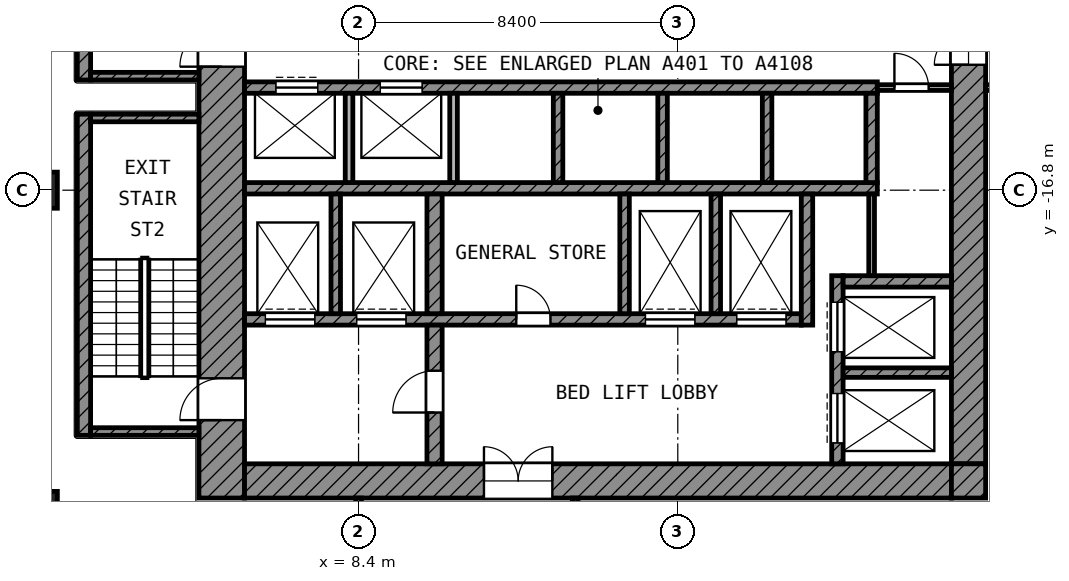
"""IFC4 building model, lengths in metres.
Left out: names, types, materials, properties, quantities, classifications, styles, units other than length and angle.
Written with IfcOpenShell. Run it as: python <this file> out.ifc"""

import sys

from ifc_helpers import new_model, si_unit, direction, frame, frame_2d, origin, origin_2d, place, context, subcontext, project, spatial, rectangle, extrude, element, fill, save


model = new_model("IFC4")
c1 = context("Model", 3, precision=1e-05, world=origin(), true_north=direction((0.0, 1.0)))
c2 = subcontext(c1, "Body", "Model", "MODEL_VIEW")
j1 = project(units=[si_unit("LENGTHUNIT", "METRE"), si_unit("PLANEANGLEUNIT", "RADIAN")], contexts=[c1])
p1 = place(None, origin())
s1 = spatial("IfcSite", under=j1, at=p1, CompositionType="ELEMENT")
p2 = place(p1, origin())
s2 = spatial("IfcBuilding", under=s1, at=p2, CompositionType="ELEMENT")
p3 = place(p2, frame((0.0, 0.0, 166.8)))
s3 = spatial("IfcBuildingStorey", under=s2, at=p3, CompositionType="ELEMENT", Elevation=166.8)
for number, where, z_axis, x_axis in (
    (1, (0.0, -16.8, 0.0), (0.0, 0.0, 1.0), (1.0, 0.0, 0.0)),
    (2, (0.0, -25.2, 0.0), (0.0, 0.0, 1.0), (1.0, 0.0, 0.0)),
):
    element("IfcColumn", number, at=place(p3, frame(where, z_axis=z_axis, x_axis=x_axis)), inside=s3, PredefinedType="COLUMN", context=c2, shape_type="SweptSolid", body=[
        extrude(rectangle(XDim=0.95, YDim=0.95, at=origin_2d()), origin(), (0.0, 0.0, 1.0), 4.2),
    ])
p4 = place(p3, frame((4.8, -24.9, 0.0), z_axis=(0.0, 0.0, 1.0), x_axis=(0.0, 1.0, 0.0)))
e3 = element("IfcWall", 3, at=p4, inside=s3, PredefinedType="SHEAR", context=c2, shape_type="SweptSolid", body=[
    extrude(rectangle(XDim=19.5, YDim=1.2, at=frame_2d((9.75, 0.0))), origin(), (0.0, 0.0, 1.0), 3.6),
])
p5 = place(p4, frame((11.35, 0.0, 0.0)))
e4 = element("IfcOpeningElement", 4, at=p5, cuts=e3, PredefinedType="OPENING", context=c2, shape_type="SweptSolid", body=[
    extrude(rectangle(XDim=1.1, YDim=2.1, at=frame_2d((0.55, 1.05))), frame((0.0, 0.61, 0.0), z_axis=(0.0, -1.0, 0.0), x_axis=(1.0, 0.0, 0.0)), (0.0, 0.0, 1.0), 1.22),
])
p6 = place(p4, frame((2.05, 0.0, 0.0)))
e5 = element("IfcOpeningElement", 5, at=p6, cuts=e3, PredefinedType="OPENING", context=c2, shape_type="SweptSolid", body=[
    extrude(rectangle(XDim=1.1, YDim=2.1, at=frame_2d((0.55, 1.05))), frame((0.0, 0.61, 0.0), z_axis=(0.0, -1.0, 0.0), x_axis=(1.0, 0.0, 0.0)), (0.0, 0.0, 1.0), 1.22),
])
p7 = place(p3, frame((24.45, -24.0, 0.0), z_axis=(0.0, 0.0, 1.0), x_axis=(0.0, 1.0, 0.0)))
e6 = element("IfcWall", 6, at=p7, inside=s3, PredefinedType="SHEAR", context=c2, shape_type="SweptSolid", body=[
    extrude(rectangle(XDim=18.6, YDim=0.9, at=frame_2d((9.3, 0.0))), origin(), (0.0, 0.0, 1.0), 3.6),
])
p8 = place(p7, frame((10.5, 0.0, 0.0)))
e7 = element("IfcOpeningElement", 7, at=p8, cuts=e6, PredefinedType="OPENING", context=c2, shape_type="SweptSolid", body=[
    extrude(rectangle(XDim=1.8, YDim=2.1, at=frame_2d((0.9, 1.05))), frame((0.0, 0.46, 0.0), z_axis=(0.0, -1.0, 0.0), x_axis=(1.0, 0.0, 0.0)), (0.0, 0.0, 1.0), 0.92),
])
p9 = place(p3, frame((5.4, -24.45, 0.0), z_axis=(0.0, 0.0, 1.0), x_axis=(1.0, 0.0, 0.0)))
e8 = element("IfcWall", 8, at=p9, inside=s3, PredefinedType="SHEAR", context=c2, shape_type="SweptSolid", body=[
    extrude(rectangle(XDim=18.6, YDim=0.9, at=frame_2d((9.3, 0.0))), origin(), (0.0, 0.0, 1.0), 3.6),
])
p10 = place(p9, frame((6.3, 0.0, 0.0)))
e9 = element("IfcOpeningElement", 9, at=p10, cuts=e8, PredefinedType="OPENING", context=c2, shape_type="SweptSolid", body=[
    extrude(rectangle(XDim=1.8, YDim=2.1, at=frame_2d((0.9, 1.05))), frame((0.0, 0.46, 0.0), z_axis=(0.0, -1.0, 0.0), x_axis=(1.0, 0.0, 0.0)), (0.0, 0.0, 1.0), 0.92),
])
p11 = place(p3, frame((24.45, -24.9, 0.0), z_axis=(0.0, 0.0, 1.0), x_axis=(0.0, 1.0, 0.0)))
e10 = element("IfcWall", 10, at=p11, inside=s3, PredefinedType="SHEAR", context=c2, shape_type="SweptSolid", body=[
    extrude(rectangle(XDim=0.9, YDim=0.9, at=frame_2d((0.45, 0.0))), origin(), (0.0, 0.0, 1.0), 3.6),
])
p12 = place(p3, frame((5.4, -14.1, 0.0), z_axis=(0.0, 0.0, 1.0), x_axis=(1.0, 0.0, 0.0)))
e11 = element("IfcWall", 11, at=p12, inside=s3, PredefinedType="SHEAR", context=c2, shape_type="SweptSolid", body=[
    extrude(rectangle(XDim=16.65, YDim=0.3, at=frame_2d((8.325, 0.0))), origin(), (0.0, 0.0, 1.0), 3.6),
])
p13 = place(p12, frame((0.825, 0.0, 0.0)))
e12 = element("IfcOpeningElement", 12, at=p13, cuts=e11, PredefinedType="OPENING", context=c2, shape_type="SweptSolid", body=[
    extrude(rectangle(XDim=1.1, YDim=2.1, at=frame_2d((0.55, 1.05))), frame((0.0, 0.16, 0.0), z_axis=(0.0, -1.0, 0.0), x_axis=(1.0, 0.0, 0.0)), (0.0, 0.0, 1.0), 0.32),
])
p14 = place(p12, frame((3.575, 0.0, 0.0)))
e13 = element("IfcOpeningElement", 13, at=p14, cuts=e11, PredefinedType="OPENING", context=c2, shape_type="SweptSolid", body=[
    extrude(rectangle(XDim=1.1, YDim=2.1, at=frame_2d((0.55, 1.05))), frame((0.0, 0.16, 0.0), z_axis=(0.0, -1.0, 0.0), x_axis=(1.0, 0.0, 0.0)), (0.0, 0.0, 1.0), 0.32),
])
p15 = place(p3, frame((5.4, -16.75, 0.0), z_axis=(0.0, 0.0, 1.0), x_axis=(1.0, 0.0, 0.0)))
e14 = element("IfcWall", 14, at=p15, inside=s3, PredefinedType="SHEAR", context=c2, shape_type="SweptSolid", body=[
    extrude(rectangle(XDim=16.65, YDim=0.3, at=frame_2d((8.325, 0.0))), origin(), (0.0, 0.0, 1.0), 3.6),
])
p16 = place(p3, frame((5.4, -20.2, 0.0), z_axis=(0.0, 0.0, 1.0), x_axis=(1.0, 0.0, 0.0)))
e15 = element("IfcWall", 15, at=p16, inside=s3, PredefinedType="SHEAR", context=c2, shape_type="SweptSolid", body=[
    extrude(rectangle(XDim=14.65, YDim=0.3, at=frame_2d((7.325, 0.0))), origin(), (0.0, 0.0, 1.0), 3.6),
])
p17 = place(p16, frame((10.55, 0.0, 0.0)))
e16 = element("IfcOpeningElement", 16, at=p17, cuts=e15, PredefinedType="OPENING", context=c2, shape_type="SweptSolid", body=[
    extrude(rectangle(XDim=1.3, YDim=2.1, at=frame_2d((0.65, 1.05))), frame((0.0, 0.16, 0.0), z_axis=(0.0, -1.0, 0.0), x_axis=(1.0, 0.0, 0.0)), (0.0, 0.0, 1.0), 0.32),
])
p18 = place(p16, frame((12.95, 0.0, 0.0)))
e17 = element("IfcOpeningElement", 17, at=p18, cuts=e15, PredefinedType="OPENING", context=c2, shape_type="SweptSolid", body=[
    extrude(rectangle(XDim=1.3, YDim=2.1, at=frame_2d((0.65, 1.05))), frame((0.0, 0.16, 0.0), z_axis=(0.0, -1.0, 0.0), x_axis=(1.0, 0.0, 0.0)), (0.0, 0.0, 1.0), 0.32),
])
p19 = place(p16, frame((0.55, 0.0, 0.0)))
e18 = element("IfcOpeningElement", 18, at=p19, cuts=e15, PredefinedType="OPENING", context=c2, shape_type="SweptSolid", body=[
    extrude(rectangle(XDim=1.3, YDim=2.1, at=frame_2d((0.65, 1.05))), frame((0.0, 0.16, 0.0), z_axis=(0.0, -1.0, 0.0), x_axis=(1.0, 0.0, 0.0)), (0.0, 0.0, 1.0), 0.32),
])
p20 = place(p16, frame((2.95, 0.0, 0.0)))
e19 = element("IfcOpeningElement", 19, at=p20, cuts=e15, PredefinedType="OPENING", context=c2, shape_type="SweptSolid", body=[
    extrude(rectangle(XDim=1.3, YDim=2.1, at=frame_2d((0.65, 1.05))), frame((0.0, 0.16, 0.0), z_axis=(0.0, -1.0, 0.0), x_axis=(1.0, 0.0, 0.0)), (0.0, 0.0, 1.0), 0.32),
])
p21 = place(p16, frame((7.15, 0.0, 0.0)))
e20 = element("IfcOpeningElement", 20, at=p21, cuts=e15, PredefinedType="OPENING", context=c2, shape_type="SweptSolid", body=[
    extrude(rectangle(XDim=0.9, YDim=2.1, at=frame_2d((0.45, 1.05))), frame((0.0, 0.16, 0.0), z_axis=(0.0, -1.0, 0.0), x_axis=(1.0, 0.0, 0.0)), (0.0, 0.0, 1.0), 0.32),
])
p22 = place(p3, frame((10.4, -24.0, 0.0), z_axis=(0.0, 0.0, 1.0), x_axis=(0.0, 1.0, 0.0)))
e21 = element("IfcWall", 21, at=p22, inside=s3, PredefinedType="SHEAR", context=c2, shape_type="SweptSolid", body=[
    extrude(rectangle(XDim=3.65, YDim=0.4, at=frame_2d((1.825, 0.0))), origin(), (0.0, 0.0, 1.0), 3.6),
])
p23 = place(p22, frame((1.35, 0.0, 0.0)))
e22 = element("IfcOpeningElement", 22, at=p23, cuts=e21, PredefinedType="OPENING", context=c2, shape_type="SweptSolid", body=[
    extrude(rectangle(XDim=1.1, YDim=2.1, at=frame_2d((0.55, 1.05))), frame((0.0, 0.21, 0.0), z_axis=(0.0, -1.0, 0.0), x_axis=(1.0, 0.0, 0.0)), (0.0, 0.0, 1.0), 0.42),
])
p24 = place(p3, frame((10.4, -20.05, 0.0), z_axis=(0.0, 0.0, 1.0), x_axis=(0.0, 1.0, 0.0)))
e23 = element("IfcWall", 23, at=p24, inside=s3, PredefinedType="SHEAR", context=c2, shape_type="SweptSolid", body=[
    extrude(rectangle(XDim=3.15, YDim=0.4, at=frame_2d((1.575, 0.0))), origin(), (0.0, 0.0, 1.0), 3.6),
])
p25 = place(p3, frame((20.2, -20.35, 0.0), z_axis=(0.0, 0.0, 1.0), x_axis=(0.0, 1.0, 0.0)))
e24 = element("IfcWall", 24, at=p25, inside=s3, PredefinedType="SHEAR", context=c2, shape_type="SweptSolid", body=[
    extrude(rectangle(XDim=3.45, YDim=0.3, at=frame_2d((1.725, 0.0))), origin(), (0.0, 0.0, 1.0), 3.6),
])
p26 = place(p3, frame((21.9, -16.6, 0.0), z_axis=(0.0, 0.0, 1.0), x_axis=(0.0, 1.0, 0.0)))
e25 = element("IfcWall", 25, at=p26, inside=s3, PredefinedType="SHEAR", context=c2, shape_type="SweptSolid", body=[
    extrude(rectangle(XDim=2.35, YDim=0.3, at=frame_2d((1.175, 0.0))), origin(), (0.0, 0.0, 1.0), 3.6),
])
p27 = place(p3, frame((21.15, -19.2, 0.0), z_axis=(0.0, 0.0, 1.0), x_axis=(1.0, 0.0, 0.0)))
e26 = element("IfcWall", 26, at=p27, inside=s3, PredefinedType="SHEAR", context=c2, shape_type="SweptSolid", body=[
    extrude(rectangle(XDim=2.85, YDim=0.3, at=frame_2d((1.425, 0.0))), origin(), (0.0, 0.0, 1.0), 3.6),
])
p28 = place(p3, frame((21.0, -24.0, 0.0), z_axis=(0.0, 0.0, 1.0), x_axis=(0.0, 1.0, 0.0)))
e27 = element("IfcWall", 27, at=p28, inside=s3, PredefinedType="SHEAR", context=c2, shape_type="SweptSolid", body=[
    extrude(rectangle(XDim=4.95, YDim=0.3, at=frame_2d((2.475, 0.0))), origin(), (0.0, 0.0, 1.0), 3.6),
])
p29 = place(p28, frame((2.95, 0.0, 0.0)))
e28 = element("IfcOpeningElement", 28, at=p29, cuts=e27, PredefinedType="OPENING", context=c2, shape_type="SweptSolid", body=[
    extrude(rectangle(XDim=1.3, YDim=2.1, at=frame_2d((0.65, 1.05))), frame((0.0, 0.16, 0.0), z_axis=(0.0, -1.0, 0.0), x_axis=(1.0, 0.0, 0.0)), (0.0, 0.0, 1.0), 0.32),
])
p30 = place(p28, frame((0.55, 0.0, 0.0)))
e29 = element("IfcOpeningElement", 29, at=p30, cuts=e27, PredefinedType="OPENING", context=c2, shape_type="SweptSolid", body=[
    extrude(rectangle(XDim=1.3, YDim=2.1, at=frame_2d((0.65, 1.05))), frame((0.0, 0.16, 0.0), z_axis=(0.0, -1.0, 0.0), x_axis=(1.0, 0.0, 0.0)), (0.0, 0.0, 1.0), 0.32),
])
p31 = place(p3, frame((21.15, -21.6, 0.0), z_axis=(0.0, 0.0, 1.0), x_axis=(1.0, 0.0, 0.0)))
e30 = element("IfcWall", 30, at=p31, inside=s3, PredefinedType="SHEAR", context=c2, shape_type="SweptSolid", body=[
    extrude(rectangle(XDim=2.85, YDim=0.25, at=frame_2d((1.425, 0.0))), origin(), (0.0, 0.0, 1.0), 3.6),
])
for number, where, z_axis, x_axis in (
    (31, (7.8, -20.05, 0.0), (0.0, 0.0, 1.0), (0.0, 1.0, 0.0)),
    (32, (15.4, -20.05, 0.0), (0.0, 0.0, 1.0), (0.0, 1.0, 0.0)),
    (33, (17.8, -20.05, 0.0), (0.0, 0.0, 1.0), (0.0, 1.0, 0.0)),
):
    element("IfcWall", number, at=place(p3, frame(where, z_axis=z_axis, x_axis=x_axis)), inside=s3, PredefinedType="SHEAR", context=c2, shape_type="SweptSolid", body=[
        extrude(rectangle(XDim=3.15, YDim=0.25, at=frame_2d((1.575, 0.0))), origin(), (0.0, 0.0, 1.0), 3.6),
    ])
for number, where, z_axis, x_axis in (
    (34, (8.15, -16.6, 0.0), (0.0, 0.0, 1.0), (0.0, 1.0, 0.0)),
    (35, (10.9, -16.6, 0.0), (0.0, 0.0, 1.0), (0.0, 1.0, 0.0)),
):
    element("IfcWall", number, at=place(p3, frame(where, z_axis=z_axis, x_axis=x_axis)), inside=s3, PredefinedType="PARTITIONING", context=c2, shape_type="SweptSolid", body=[
        extrude(rectangle(XDim=2.35, YDim=0.2, at=frame_2d((1.175, 0.0))), origin(), (0.0, 0.0, 1.0), 3.6),
    ])
for number, where, z_axis, x_axis in (
    (36, (13.65, -16.6, 0.0), (0.0, 0.0, 1.0), (0.0, 1.0, 0.0)),
    (37, (16.4, -16.6, 0.0), (0.0, 0.0, 1.0), (0.0, 1.0, 0.0)),
    (38, (19.15, -16.6, 0.0), (0.0, 0.0, 1.0), (0.0, 1.0, 0.0)),
):
    element("IfcWall", number, at=place(p3, frame(where, z_axis=z_axis, x_axis=x_axis)), inside=s3, PredefinedType="SHEAR", context=c2, shape_type="SweptSolid", body=[
        extrude(rectangle(XDim=2.35, YDim=0.25, at=frame_2d((1.175, 0.0))), origin(), (0.0, 0.0, 1.0), 3.6),
    ])
p32 = place(p3, frame((21.9, -19.05, 0.0), z_axis=(0.0, 0.0, 1.0), x_axis=(0.0, 1.0, 0.0)))
e39 = element("IfcWall", 39, at=p32, inside=s3, PredefinedType="PARTITIONING", context=c2, shape_type="SweptSolid", body=[
    extrude(rectangle(XDim=2.15, YDim=0.15, at=frame_2d((1.075, 0.0))), origin(), (0.0, 0.0, 1.0), 3.6),
])
p33 = place(p3, frame((22.05, -14.1, 0.0), z_axis=(0.0, 0.0, 1.0), x_axis=(1.0, 0.0, 0.0)))
e40 = element("IfcWall", 40, at=p33, inside=s3, PredefinedType="PARTITIONING", context=c2, shape_type="SweptSolid", body=[
    extrude(rectangle(XDim=1.95, YDim=0.15, at=frame_2d((0.975, 0.0))), origin(), (0.0, 0.0, 1.0), 3.6),
])
p34 = place(p33, frame((0.45, 0.0, 0.0)))
e41 = element("IfcOpeningElement", 41, at=p34, cuts=e40, PredefinedType="OPENING", context=c2, shape_type="SweptSolid", body=[
    extrude(rectangle(XDim=0.9, YDim=2.1, at=frame_2d((0.45, 1.05))), frame((0.0, 0.085, 0.0), z_axis=(0.0, -1.0, 0.0), x_axis=(1.0, 0.0, 0.0)), (0.0, 0.0, 1.0), 0.17),
])
p35 = place(p3, frame((1.175, -13.9, 0.0), z_axis=(0.0, 0.0, 1.0), x_axis=(0.0, 1.0, 0.0)))
e42 = element("IfcWall", 42, at=p35, inside=s3, PredefinedType="SHEAR", context=c2, shape_type="SweptSolid", body=[
    extrude(rectangle(XDim=8.45, YDim=0.35, at=frame_2d((4.225, 0.0))), origin(), (0.0, 0.0, 1.0), 3.6),
])
p36 = place(p3, frame((1.35, -13.8, 0.0), z_axis=(0.0, 0.0, 1.0), x_axis=(1.0, 0.0, 0.0)))
e43 = element("IfcWall", 43, at=p36, inside=s3, PredefinedType="SHEAR", context=c2, shape_type="SweptSolid", body=[
    extrude(rectangle(XDim=2.85, YDim=0.2, at=frame_2d((1.425, 0.0))), origin(), (0.0, 0.0, 1.0), 3.6),
])
p37 = place(p3, frame((1.175, -23.25, 0.0), z_axis=(0.0, 0.0, 1.0), x_axis=(0.0, 1.0, 0.0)))
e44 = element("IfcWall", 44, at=p37, inside=s3, PredefinedType="SHEAR", context=c2, shape_type="SweptSolid", body=[
    extrude(rectangle(XDim=8.45, YDim=0.35, at=frame_2d((4.225, 0.0))), origin(), (0.0, 0.0, 1.0), 3.6),
])
for number, where, z_axis, x_axis in (
    (45, (1.35, -14.9, 0.0), (0.0, 0.0, 1.0), (1.0, 0.0, 0.0)),
    (46, (1.35, -23.15, 0.0), (0.0, 0.0, 1.0), (1.0, 0.0, 0.0)),
):
    element("IfcWall", number, at=place(p3, frame(where, z_axis=z_axis, x_axis=x_axis)), inside=s3, PredefinedType="SHEAR", context=c2, shape_type="SweptSolid", body=[
        extrude(rectangle(XDim=2.85, YDim=0.2, at=frame_2d((1.425, 0.0))), origin(), (0.0, 0.0, 1.0), 3.6),
    ])
p38 = place(p3, frame((24.9, -14.1, 0.0), z_axis=(0.0, 0.0, 1.0), x_axis=(1.0, 0.0, 0.0)))
e47 = element("IfcWall", 47, at=p38, inside=s3, PredefinedType="PARTITIONING", context=c2, shape_type="SweptSolid", body=[
    extrude(rectangle(XDim=4.425, YDim=0.15, at=frame_2d((2.212, 0.0))), origin(), (0.0, 0.0, 1.0), 3.6),
])
p39 = place(p38, frame((1.65, 0.0, 0.0)))
e48 = element("IfcOpeningElement", 48, at=p39, cuts=e47, PredefinedType="OPENING", context=c2, shape_type="SweptSolid", body=[
    extrude(rectangle(XDim=1.5, YDim=2.1, at=frame_2d((0.75, 1.05))), frame((0.0, 0.085, 0.0), z_axis=(0.0, -1.0, 0.0), x_axis=(1.0, 0.0, 0.0)), (0.0, 0.0, 1.0), 0.17),
])
p40 = place(p3, frame((8.4, -31.857, 0.0), z_axis=(0.0, 0.0, 1.0), x_axis=(0.0, 1.0, 0.0)))
e49 = element("IfcWall", 49, at=p40, inside=s3, PredefinedType="PARTITIONING", context=c2, shape_type="SweptSolid", body=[
    extrude(rectangle(XDim=6.957, YDim=0.15, at=frame_2d((3.479, 0.0))), origin(), (0.0, 0.0, 1.0), 3.6),
])
p41 = place(p3, frame((14.1, -29.325, 0.0), z_axis=(0.0, 0.0, 1.0), x_axis=(0.0, 1.0, 0.0)))
e50 = element("IfcWall", 50, at=p41, inside=s3, PredefinedType="PARTITIONING", context=c2, shape_type="SweptSolid", body=[
    extrude(rectangle(XDim=4.425, YDim=0.15, at=frame_2d((2.212, 0.0))), origin(), (0.0, 0.0, 1.0), 3.6),
])
p42 = place(p13, origin())
e51 = element("IfcDoor", 51, at=p42, inside=s3, OperationType="DOUBLE_DOOR_SLIDING", PredefinedType="DOOR", context=c2, shape_type="SweptSolid", body=[
    extrude(rectangle(XDim=1.1, YDim=2.1, at=frame_2d((0.55, 1.05))), frame((0.0, 0.025, 0.0), z_axis=(0.0, -1.0, 0.0), x_axis=(1.0, 0.0, 0.0)), (0.0, 0.0, 1.0), 0.05),
])
fill(e12, e51)
p43 = place(p14, origin())
e52 = element("IfcDoor", 52, at=p43, inside=s3, OperationType="DOUBLE_DOOR_SLIDING", PredefinedType="DOOR", context=c2, shape_type="SweptSolid", body=[
    extrude(rectangle(XDim=1.1, YDim=2.1, at=frame_2d((0.55, 1.05))), frame((0.0, 0.025, 0.0), z_axis=(0.0, -1.0, 0.0), x_axis=(1.0, 0.0, 0.0)), (0.0, 0.0, 1.0), 0.05),
])
fill(e13, e52)
p44 = place(p29, origin())
e53 = element("IfcDoor", 53, at=p44, inside=s3, OperationType="DOUBLE_DOOR_SLIDING", PredefinedType="DOOR", context=c2, shape_type="SweptSolid", body=[
    extrude(rectangle(XDim=1.3, YDim=2.1, at=frame_2d((0.65, 1.05))), frame((0.0, 0.025, 0.0), z_axis=(0.0, -1.0, 0.0), x_axis=(1.0, 0.0, 0.0)), (0.0, 0.0, 1.0), 0.05),
])
fill(e28, e53)
p45 = place(p30, origin())
e54 = element("IfcDoor", 54, at=p45, inside=s3, OperationType="DOUBLE_DOOR_SLIDING", PredefinedType="DOOR", context=c2, shape_type="SweptSolid", body=[
    extrude(rectangle(XDim=1.3, YDim=2.1, at=frame_2d((0.65, 1.05))), frame((0.0, 0.025, 0.0), z_axis=(0.0, -1.0, 0.0), x_axis=(1.0, 0.0, 0.0)), (0.0, 0.0, 1.0), 0.05),
])
fill(e29, e54)
p46 = place(p17, origin())
e55 = element("IfcDoor", 55, at=p46, inside=s3, OperationType="DOUBLE_DOOR_SLIDING", PredefinedType="DOOR", context=c2, shape_type="SweptSolid", body=[
    extrude(rectangle(XDim=1.3, YDim=2.1, at=frame_2d((0.65, 1.05))), frame((0.0, 0.025, 0.0), z_axis=(0.0, -1.0, 0.0), x_axis=(1.0, 0.0, 0.0)), (0.0, 0.0, 1.0), 0.05),
])
fill(e16, e55)
p47 = place(p18, origin())
e56 = element("IfcDoor", 56, at=p47, inside=s3, OperationType="DOUBLE_DOOR_SLIDING", PredefinedType="DOOR", context=c2, shape_type="SweptSolid", body=[
    extrude(rectangle(XDim=1.3, YDim=2.1, at=frame_2d((0.65, 1.05))), frame((0.0, 0.025, 0.0), z_axis=(0.0, -1.0, 0.0), x_axis=(1.0, 0.0, 0.0)), (0.0, 0.0, 1.0), 0.05),
])
fill(e17, e56)
p48 = place(p19, origin())
e57 = element("IfcDoor", 57, at=p48, inside=s3, OperationType="DOUBLE_DOOR_SLIDING", PredefinedType="DOOR", context=c2, shape_type="SweptSolid", body=[
    extrude(rectangle(XDim=1.3, YDim=2.1, at=frame_2d((0.65, 1.05))), frame((0.0, 0.025, 0.0), z_axis=(0.0, -1.0, 0.0), x_axis=(1.0, 0.0, 0.0)), (0.0, 0.0, 1.0), 0.05),
])
fill(e18, e57)
p49 = place(p20, origin())
e58 = element("IfcDoor", 58, at=p49, inside=s3, OperationType="DOUBLE_DOOR_SLIDING", PredefinedType="DOOR", context=c2, shape_type="SweptSolid", body=[
    extrude(rectangle(XDim=1.3, YDim=2.1, at=frame_2d((0.65, 1.05))), frame((0.0, 0.025, 0.0), z_axis=(0.0, -1.0, 0.0), x_axis=(1.0, 0.0, 0.0)), (0.0, 0.0, 1.0), 0.05),
])
fill(e19, e58)
p50 = place(p5, origin())
e59 = element("IfcDoor", 59, at=p50, inside=s3, OperationType="SINGLE_SWING_LEFT", PredefinedType="DOOR", context=c2, shape_type="SweptSolid", body=[
    extrude(rectangle(XDim=1.1, YDim=2.1, at=frame_2d((0.55, 1.05))), frame((0.0, 0.025, 0.0), z_axis=(0.0, -1.0, 0.0), x_axis=(1.0, 0.0, 0.0)), (0.0, 0.0, 1.0), 0.05),
])
fill(e4, e59)
p51 = place(p6, origin())
e60 = element("IfcDoor", 60, at=p51, inside=s3, OperationType="SINGLE_SWING_LEFT", PredefinedType="DOOR", context=c2, shape_type="SweptSolid", body=[
    extrude(rectangle(XDim=1.1, YDim=2.1, at=frame_2d((0.55, 1.05))), frame((0.0, 0.025, 0.0), z_axis=(0.0, -1.0, 0.0), x_axis=(1.0, 0.0, 0.0)), (0.0, 0.0, 1.0), 0.05),
])
fill(e5, e60)
p52 = place(p23, origin())
e61 = element("IfcDoor", 61, at=p52, inside=s3, OperationType="SINGLE_SWING_LEFT", PredefinedType="DOOR", context=c2, shape_type="SweptSolid", body=[
    extrude(rectangle(XDim=1.1, YDim=2.1, at=frame_2d((0.55, 1.05))), frame((0.0, 0.025, 0.0), z_axis=(0.0, -1.0, 0.0), x_axis=(1.0, 0.0, 0.0)), (0.0, 0.0, 1.0), 0.05),
])
fill(e22, e61)
p53 = place(p8, origin())
e62 = element("IfcDoor", 62, at=p53, inside=s3, OperationType="DOUBLE_DOOR_SINGLE_SWING", PredefinedType="DOOR", context=c2, shape_type="SweptSolid", body=[
    extrude(rectangle(XDim=1.8, YDim=2.1, at=frame_2d((0.9, 1.05))), frame((0.0, 0.025, 0.0), z_axis=(0.0, -1.0, 0.0), x_axis=(1.0, 0.0, 0.0)), (0.0, 0.0, 1.0), 0.05),
])
fill(e7, e62)
p54 = place(p10, origin())
e63 = element("IfcDoor", 63, at=p54, inside=s3, OperationType="DOUBLE_DOOR_SINGLE_SWING", PredefinedType="DOOR", context=c2, shape_type="SweptSolid", body=[
    extrude(rectangle(XDim=1.8, YDim=2.1, at=frame_2d((0.9, 1.05))), frame((0.0, 0.025, 0.0), z_axis=(0.0, -1.0, 0.0), x_axis=(1.0, 0.0, 0.0)), (0.0, 0.0, 1.0), 0.05),
])
fill(e9, e63)
p55 = place(p34, origin())
e64 = element("IfcDoor", 64, at=p55, inside=s3, OperationType="SINGLE_SWING_LEFT", PredefinedType="DOOR", context=c2, shape_type="SweptSolid", body=[
    extrude(rectangle(XDim=0.9, YDim=2.1, at=frame_2d((0.45, 1.05))), frame((0.0, 0.025, 0.0), z_axis=(0.0, -1.0, 0.0), x_axis=(1.0, 0.0, 0.0)), (0.0, 0.0, 1.0), 0.05),
])
fill(e41, e64)
p56 = place(p21, origin())
e65 = element("IfcDoor", 65, at=p56, inside=s3, OperationType="SINGLE_SWING_LEFT", PredefinedType="DOOR", context=c2, shape_type="SweptSolid", body=[
    extrude(rectangle(XDim=0.9, YDim=2.1, at=frame_2d((0.45, 1.05))), frame((0.0, 0.025, 0.0), z_axis=(0.0, -1.0, 0.0), x_axis=(1.0, 0.0, 0.0)), (0.0, 0.0, 1.0), 0.05),
])
fill(e20, e65)
save(model, sys.argv[1])
